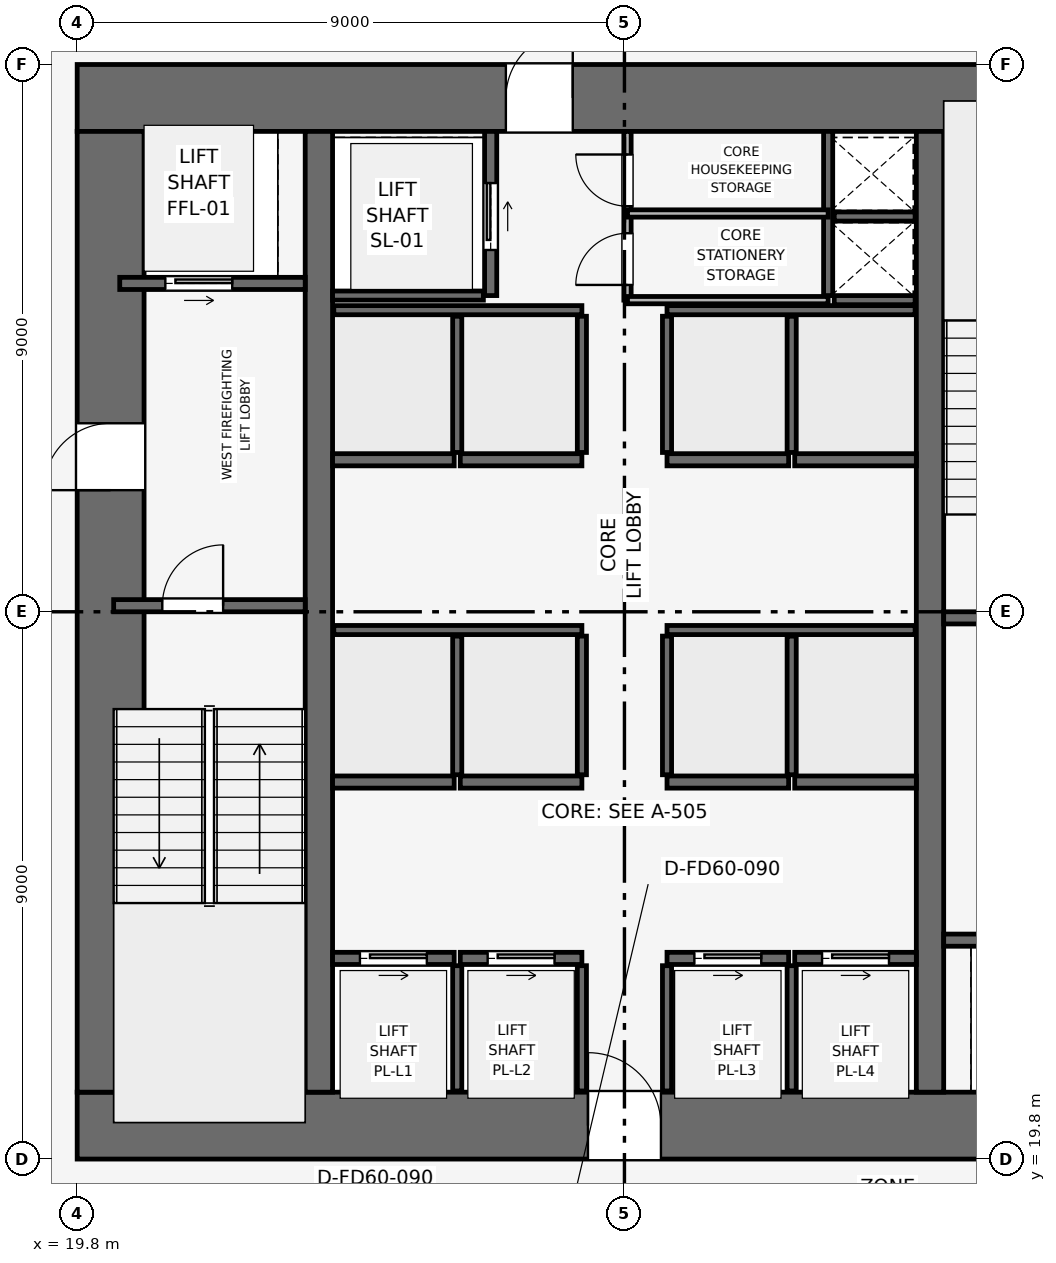
"""IFC4 building model, lengths in metres.
Left out: names, types, materials, properties, quantities, classifications, styles, units other than length and angle.
Written with IfcOpenShell. Run it as: python <this file> out.ifc"""

import sys

from ifc_helpers import new_model, si_unit, direction, frame, frame_2d, origin, place, context, subcontext, project, spatial, rectangle, extrude, element, fill, save


model = new_model("IFC4")
c1 = context("Model", 3, precision=1e-05, world=origin(), true_north=direction((0.0, 1.0)))
c2 = subcontext(c1, "Body", "Model", "MODEL_VIEW")
j1 = project(units=[si_unit("LENGTHUNIT", "METRE"), si_unit("PLANEANGLEUNIT", "RADIAN")], contexts=[c1])
p1 = place(None, origin())
s1 = spatial("IfcSite", under=j1, at=p1, CompositionType="ELEMENT")
p2 = place(p1, origin())
s2 = spatial("IfcBuilding", under=s1, at=p2, CompositionType="ELEMENT")
p3 = place(p2, frame((0.0, 0.0, 80.7)))
s3 = spatial("IfcBuildingStorey", under=s2, at=p3, CompositionType="ELEMENT", Elevation=80.7)
p4 = place(p3, frame((19.8, 20.35, 0.0), z_axis=(0.0, 0.0, 1.0), x_axis=(1.0, 0.0, 0.0)))
e1 = element("IfcWall", 1, at=p4, inside=s3, PredefinedType="SHEAR", context=c2, shape_type="SweptSolid", body=[
    extrude(rectangle(XDim=18.0, YDim=1.1, at=frame_2d((9.0, 0.0))), origin(), (0.0, 0.0, 1.0), 3.9),
])
p5 = place(p4, frame((8.4, 0.0, 0.0)))
e2 = element("IfcOpeningElement", 2, at=p5, cuts=e1, PredefinedType="OPENING", context=c2, shape_type="SweptSolid", body=[
    extrude(rectangle(XDim=1.2, YDim=2.2, at=frame_2d((0.6, 1.1))), frame((0.0, 0.56, 0.0), z_axis=(0.0, -1.0, 0.0), x_axis=(1.0, 0.0, 0.0)), (0.0, 0.0, 1.0), 1.12),
])
p6 = place(p3, frame((19.8, 37.25, 0.0), z_axis=(0.0, 0.0, 1.0), x_axis=(1.0, 0.0, 0.0)))
e3 = element("IfcWall", 3, at=p6, inside=s3, PredefinedType="SHEAR", context=c2, shape_type="SweptSolid", body=[
    extrude(rectangle(XDim=18.0, YDim=1.1, at=frame_2d((9.0, 0.0))), origin(), (0.0, 0.0, 1.0), 3.9),
])
p7 = place(p6, frame((7.05, 0.0, 0.0)))
e4 = element("IfcOpeningElement", 4, at=p7, cuts=e3, PredefinedType="OPENING", context=c2, shape_type="SweptSolid", body=[
    extrude(rectangle(XDim=1.1, YDim=2.15, at=frame_2d((0.55, 1.075))), frame((0.0, 0.56, 0.0), z_axis=(0.0, -1.0, 0.0), x_axis=(1.0, 0.0, 0.0)), (0.0, 0.0, 1.0), 1.12),
])
p8 = place(p3, frame((20.35, 20.9, 0.0), z_axis=(0.0, 0.0, 1.0), x_axis=(0.0, 1.0, 0.0)))
e5 = element("IfcWall", 5, at=p8, inside=s3, PredefinedType="SHEAR", context=c2, shape_type="SweptSolid", body=[
    extrude(rectangle(XDim=15.8, YDim=1.1, at=frame_2d((7.9, 0.0))), origin(), (0.0, 0.0, 1.0), 3.9),
])
p9 = place(p8, frame((9.9, 0.0, 0.0)))
e6 = element("IfcOpeningElement", 6, at=p9, cuts=e5, PredefinedType="OPENING", context=c2, shape_type="SweptSolid", body=[
    extrude(rectangle(XDim=1.1, YDim=2.15, at=frame_2d((0.55, 1.075))), frame((0.0, 0.56, 0.0), z_axis=(0.0, -1.0, 0.0), x_axis=(1.0, 0.0, 0.0)), (0.0, 0.0, 1.0), 1.12),
])
for number, where, z_axis, x_axis in (
    (7, (23.775, 20.9, 0.0), (0.0, 0.0, 1.0), (0.0, 1.0, 0.0)),
    (8, (33.825, 20.9, 0.0), (0.0, 0.0, 1.0), (0.0, 1.0, 0.0)),
):
    element("IfcWall", number, at=place(p3, frame(where, z_axis=z_axis, x_axis=x_axis)), inside=s3, PredefinedType="SHEAR", context=c2, shape_type="SweptSolid", body=[
        extrude(rectangle(XDim=15.8, YDim=0.45, at=frame_2d((7.9, 0.0))), origin(), (0.0, 0.0, 1.0), 3.9),
    ])
p10 = place(p3, frame((20.4, 28.9, 0.0), z_axis=(0.0, 0.0, 1.0), x_axis=(1.0, 0.0, 0.0)))
e9 = element("IfcWall", 9, at=p10, inside=s3, PredefinedType="SHEAR", context=c2, shape_type="SweptSolid", body=[
    extrude(rectangle(XDim=3.15, YDim=0.2, at=frame_2d((1.575, 0.0))), origin(), (0.0, 0.0, 1.0), 3.65),
])
p11 = place(p10, frame((0.8, 0.0, 0.0)))
e10 = element("IfcOpeningElement", 10, at=p11, cuts=e9, PredefinedType="OPENING", context=c2, shape_type="SweptSolid", body=[
    extrude(rectangle(XDim=1.0, YDim=2.1, at=frame_2d((0.5, 1.05))), frame((0.0, 0.11, 0.0), z_axis=(0.0, -1.0, 0.0), x_axis=(1.0, 0.0, 0.0)), (0.0, 0.0, 1.0), 0.22),
])
p12 = place(p3, frame((34.05, 28.7, 0.0), z_axis=(0.0, 0.0, 1.0), x_axis=(1.0, 0.0, 0.0)))
e11 = element("IfcWall", 11, at=p12, inside=s3, PredefinedType="SHEAR", context=c2, shape_type="SweptSolid", body=[
    extrude(rectangle(XDim=3.15, YDim=0.2, at=frame_2d((1.575, 0.0))), origin(), (0.0, 0.0, 1.0), 3.65),
])
p13 = place(p12, frame((0.8, 0.0, 0.0)))
e12 = element("IfcOpeningElement", 12, at=p13, cuts=e11, PredefinedType="OPENING", context=c2, shape_type="SweptSolid", body=[
    extrude(rectangle(XDim=1.0, YDim=2.1, at=frame_2d((0.5, 1.05))), frame((0.0, 0.11, 0.0), z_axis=(0.0, -1.0, 0.0), x_axis=(1.0, 0.0, 0.0)), (0.0, 0.0, 1.0), 0.22),
])
p14 = place(p3, frame((32.15, 34.0, 0.0), z_axis=(0.0, 0.0, 1.0), x_axis=(0.0, 1.0, 0.0)))
e13 = element("IfcWall", 13, at=p14, inside=s3, PredefinedType="SHEAR", context=c2, shape_type="SweptSolid", body=[
    extrude(rectangle(XDim=2.7, YDim=0.15, at=frame_2d((1.35, 0.0))), origin(), (0.0, 0.0, 1.0), 3.65),
])
for number, where, z_axis, x_axis in (
    (14, (32.25, 33.925, 0.0), (0.0, 0.0, 1.0), (1.0, 0.0, 0.0)),
    (15, (32.25, 35.3, 0.0), (0.0, 0.0, 1.0), (1.0, 0.0, 0.0)),
):
    element("IfcWall", number, at=place(p3, frame(where, z_axis=z_axis, x_axis=x_axis)), inside=s3, PredefinedType="SHEAR", context=c2, shape_type="SweptSolid", body=[
        extrude(rectangle(XDim=1.33, YDim=0.15, at=frame_2d((0.665, 0.0))), origin(), (0.0, 0.0, 1.0), 3.65),
    ])
p15 = place(p3, frame((20.5, 34.2, 0.0), z_axis=(0.0, 0.0, 1.0), x_axis=(1.0, 0.0, 0.0)))
e16 = element("IfcWall", 16, at=p15, inside=s3, PredefinedType="SHEAR", context=c2, shape_type="SweptSolid", body=[
    extrude(rectangle(XDim=3.05, YDim=0.2, at=frame_2d((1.525, 0.0))), origin(), (0.0, 0.0, 1.0), 3.65),
])
p16 = place(p15, frame((0.75, 0.0, 0.0)))
e17 = element("IfcOpeningElement", 17, at=p16, cuts=e16, PredefinedType="OPENING", context=c2, shape_type="SweptSolid", body=[
    extrude(rectangle(XDim=1.1, YDim=2.15, at=frame_2d((0.55, 1.075))), frame((0.0, 0.11, 0.0), z_axis=(0.0, -1.0, 0.0), x_axis=(1.0, 0.0, 0.0)), (0.0, 0.0, 1.0), 0.22),
])
p17 = place(p3, frame((34.05, 23.4, 0.0), z_axis=(0.0, 0.0, 1.0), x_axis=(1.0, 0.0, 0.0)))
e18 = element("IfcWall", 18, at=p17, inside=s3, PredefinedType="SHEAR", context=c2, shape_type="SweptSolid", body=[
    extrude(rectangle(XDim=3.05, YDim=0.2, at=frame_2d((1.525, 0.0))), origin(), (0.0, 0.0, 1.0), 3.65),
])
p18 = place(p17, frame((1.2, 0.0, 0.0)))
e19 = element("IfcOpeningElement", 19, at=p18, cuts=e18, PredefinedType="OPENING", context=c2, shape_type="SweptSolid", body=[
    extrude(rectangle(XDim=1.1, YDim=2.15, at=frame_2d((0.55, 1.075))), frame((0.0, 0.11, 0.0), z_axis=(0.0, -1.0, 0.0), x_axis=(1.0, 0.0, 0.0)), (0.0, 0.0, 1.0), 0.22),
])
p19 = place(p3, frame((26.6, 34.0, 0.0), z_axis=(0.0, 0.0, 1.0), x_axis=(0.0, 1.0, 0.0)))
e20 = element("IfcWall", 20, at=p19, inside=s3, PredefinedType="SHEAR", context=c2, shape_type="SweptSolid", body=[
    extrude(rectangle(XDim=2.7, YDim=0.2, at=frame_2d((1.35, 0.0))), origin(), (0.0, 0.0, 1.0), 3.65),
])
p20 = place(p19, frame((0.75, 0.0, 0.0)))
e21 = element("IfcOpeningElement", 21, at=p20, cuts=e20, PredefinedType="OPENING", context=c2, shape_type="SweptSolid", body=[
    extrude(rectangle(XDim=1.1, YDim=2.15, at=frame_2d((0.55, 1.075))), frame((0.0, 0.11, 0.0), z_axis=(0.0, -1.0, 0.0), x_axis=(1.0, 0.0, 0.0)), (0.0, 0.0, 1.0), 0.22),
])
p21 = place(p3, frame((24.0, 34.0, 0.0), z_axis=(0.0, 0.0, 1.0), x_axis=(1.0, 0.0, 0.0)))
e22 = element("IfcWall", 22, at=p21, inside=s3, PredefinedType="SHEAR", context=c2, shape_type="SweptSolid", body=[
    extrude(rectangle(XDim=2.48, YDim=0.15, at=frame_2d((1.24, 0.0))), origin(), (0.0, 0.0, 1.0), 3.65),
])
p22 = place(p3, frame((24.0, 23.1, 0.0), z_axis=(0.0, 0.0, 1.0), x_axis=(1.0, 0.0, 0.0)))
e23 = element("IfcWall", 23, at=p22, inside=s3, PredefinedType="SHEAR", context=c2, shape_type="SweptSolid", body=[
    extrude(rectangle(XDim=2.0, YDim=0.2, at=frame_2d((1.0, 0.0))), origin(), (0.0, 0.0, 1.0), 3.65),
])
p23 = place(p22, frame((0.45, 0.0, 0.0)))
e24 = element("IfcOpeningElement", 24, at=p23, cuts=e23, PredefinedType="OPENING", context=c2, shape_type="SweptSolid", body=[
    extrude(rectangle(XDim=1.1, YDim=2.15, at=frame_2d((0.55, 1.075))), frame((0.0, 0.11, 0.0), z_axis=(0.0, -1.0, 0.0), x_axis=(1.0, 0.0, 0.0)), (0.0, 0.0, 1.0), 0.22),
])
p24 = place(p3, frame((26.1, 23.1, 0.0), z_axis=(0.0, 0.0, 1.0), x_axis=(1.0, 0.0, 0.0)))
e25 = element("IfcWall", 25, at=p24, inside=s3, PredefinedType="SHEAR", context=c2, shape_type="SweptSolid", body=[
    extrude(rectangle(XDim=2.0, YDim=0.2, at=frame_2d((1.0, 0.0))), origin(), (0.0, 0.0, 1.0), 3.65),
])
p25 = place(p24, frame((0.45, 0.0, 0.0)))
e26 = element("IfcOpeningElement", 26, at=p25, cuts=e25, PredefinedType="OPENING", context=c2, shape_type="SweptSolid", body=[
    extrude(rectangle(XDim=1.1, YDim=2.15, at=frame_2d((0.55, 1.075))), frame((0.0, 0.11, 0.0), z_axis=(0.0, -1.0, 0.0), x_axis=(1.0, 0.0, 0.0)), (0.0, 0.0, 1.0), 0.22),
])
p26 = place(p3, frame((29.5, 23.1, 0.0), z_axis=(0.0, 0.0, 1.0), x_axis=(1.0, 0.0, 0.0)))
e27 = element("IfcWall", 27, at=p26, inside=s3, PredefinedType="SHEAR", context=c2, shape_type="SweptSolid", body=[
    extrude(rectangle(XDim=2.0, YDim=0.2, at=frame_2d((1.0, 0.0))), origin(), (0.0, 0.0, 1.0), 3.65),
])
p27 = place(p26, frame((0.45, 0.0, 0.0)))
e28 = element("IfcOpeningElement", 28, at=p27, cuts=e27, PredefinedType="OPENING", context=c2, shape_type="SweptSolid", body=[
    extrude(rectangle(XDim=1.1, YDim=2.15, at=frame_2d((0.55, 1.075))), frame((0.0, 0.11, 0.0), z_axis=(0.0, -1.0, 0.0), x_axis=(1.0, 0.0, 0.0)), (0.0, 0.0, 1.0), 0.22),
])
p28 = place(p3, frame((31.6, 23.1, 0.0), z_axis=(0.0, 0.0, 1.0), x_axis=(1.0, 0.0, 0.0)))
e29 = element("IfcWall", 29, at=p28, inside=s3, PredefinedType="SHEAR", context=c2, shape_type="SweptSolid", body=[
    extrude(rectangle(XDim=2.0, YDim=0.2, at=frame_2d((1.0, 0.0))), origin(), (0.0, 0.0, 1.0), 3.65),
])
p29 = place(p28, frame((0.45, 0.0, 0.0)))
e30 = element("IfcOpeningElement", 30, at=p29, cuts=e29, PredefinedType="OPENING", context=c2, shape_type="SweptSolid", body=[
    extrude(rectangle(XDim=1.1, YDim=2.15, at=frame_2d((0.55, 1.075))), frame((0.0, 0.11, 0.0), z_axis=(0.0, -1.0, 0.0), x_axis=(1.0, 0.0, 0.0)), (0.0, 0.0, 1.0), 0.22),
])
for number, where, z_axis, x_axis in (
    (31, (24.0, 26.0, 0.0), (0.0, 0.0, 1.0), (1.0, 0.0, 0.0)),
    (32, (26.1, 26.0, 0.0), (0.0, 0.0, 1.0), (1.0, 0.0, 0.0)),
    (33, (29.5, 26.0, 0.0), (0.0, 0.0, 1.0), (1.0, 0.0, 0.0)),
    (34, (31.6, 26.0, 0.0), (0.0, 0.0, 1.0), (1.0, 0.0, 0.0)),
    (35, (24.0, 31.3, 0.0), (0.0, 0.0, 1.0), (1.0, 0.0, 0.0)),
    (36, (26.1, 31.3, 0.0), (0.0, 0.0, 1.0), (1.0, 0.0, 0.0)),
    (37, (29.5, 31.3, 0.0), (0.0, 0.0, 1.0), (1.0, 0.0, 0.0)),
    (38, (31.6, 31.3, 0.0), (0.0, 0.0, 1.0), (1.0, 0.0, 0.0)),
):
    element("IfcWall", number, at=place(p3, frame(where, z_axis=z_axis, x_axis=x_axis)), inside=s3, PredefinedType="SHEAR", context=c2, shape_type="SweptSolid", body=[
        extrude(rectangle(XDim=2.0, YDim=0.2, at=frame_2d((1.0, 0.0))), origin(), (0.0, 0.0, 1.0), 3.65),
    ])
for number, where, z_axis, x_axis in (
    (39, (26.05, 20.92, 0.0), (0.0, 0.0, 1.0), (0.0, 1.0, 0.0)),
    (40, (28.1, 20.92, 0.0), (0.0, 0.0, 1.0), (0.0, 1.0, 0.0)),
    (41, (29.5, 20.92, 0.0), (0.0, 0.0, 1.0), (0.0, 1.0, 0.0)),
    (42, (31.55, 20.92, 0.0), (0.0, 0.0, 1.0), (0.0, 1.0, 0.0)),
):
    element("IfcWall", number, at=place(p3, frame(where, z_axis=z_axis, x_axis=x_axis)), inside=s3, PredefinedType="SHEAR", context=c2, shape_type="SweptSolid", body=[
        extrude(rectangle(XDim=2.06, YDim=0.15, at=frame_2d((1.03, 0.0))), origin(), (0.0, 0.0, 1.0), 3.65),
    ])
for number, where, z_axis, x_axis in (
    (43, (24.02, 28.5, 0.0), (0.0, 0.0, 1.0), (1.0, 0.0, 0.0)),
    (44, (29.5, 28.5, 0.0), (0.0, 0.0, 1.0), (1.0, 0.0, 0.0)),
):
    element("IfcWall", number, at=place(p3, frame(where, z_axis=z_axis, x_axis=x_axis)), inside=s3, PredefinedType="SHEAR", context=c2, shape_type="SweptSolid", body=[
        extrude(rectangle(XDim=4.08, YDim=0.15, at=frame_2d((2.04, 0.0))), origin(), (0.0, 0.0, 1.0), 3.65),
    ])
for number, where, z_axis, x_axis in (
    (45, (26.05, 26.12, 0.0), (0.0, 0.0, 1.0), (0.0, 1.0, 0.0)),
    (46, (28.1, 26.12, 0.0), (0.0, 0.0, 1.0), (0.0, 1.0, 0.0)),
    (47, (29.5, 26.12, 0.0), (0.0, 0.0, 1.0), (0.0, 1.0, 0.0)),
    (48, (31.55, 26.12, 0.0), (0.0, 0.0, 1.0), (0.0, 1.0, 0.0)),
):
    element("IfcWall", number, at=place(p3, frame(where, z_axis=z_axis, x_axis=x_axis)), inside=s3, PredefinedType="SHEAR", context=c2, shape_type="SweptSolid", body=[
        extrude(rectangle(XDim=2.28, YDim=0.15, at=frame_2d((1.14, 0.0))), origin(), (0.0, 0.0, 1.0), 3.65),
    ])
for number, where, z_axis, x_axis in (
    (49, (24.02, 33.76, 0.0), (0.0, 0.0, 1.0), (1.0, 0.0, 0.0)),
    (50, (29.5, 33.76, 0.0), (0.0, 0.0, 1.0), (1.0, 0.0, 0.0)),
):
    element("IfcWall", number, at=place(p3, frame(where, z_axis=z_axis, x_axis=x_axis)), inside=s3, PredefinedType="SHEAR", context=c2, shape_type="SweptSolid", body=[
        extrude(rectangle(XDim=4.08, YDim=0.15, at=frame_2d((2.04, 0.0))), origin(), (0.0, 0.0, 1.0), 3.65),
    ])
for number, where, z_axis, x_axis in (
    (51, (26.05, 31.42, 0.0), (0.0, 0.0, 1.0), (0.0, 1.0, 0.0)),
    (52, (28.1, 31.42, 0.0), (0.0, 0.0, 1.0), (0.0, 1.0, 0.0)),
    (53, (29.5, 31.42, 0.0), (0.0, 0.0, 1.0), (0.0, 1.0, 0.0)),
    (54, (31.55, 31.42, 0.0), (0.0, 0.0, 1.0), (0.0, 1.0, 0.0)),
):
    element("IfcWall", number, at=place(p3, frame(where, z_axis=z_axis, x_axis=x_axis)), inside=s3, PredefinedType="SHEAR", context=c2, shape_type="SweptSolid", body=[
        extrude(rectangle(XDim=2.24, YDim=0.15, at=frame_2d((1.12, 0.0))), origin(), (0.0, 0.0, 1.0), 3.65),
    ])
p30 = place(p3, frame((28.85, 33.925, 0.0), z_axis=(0.0, 0.0, 1.0), x_axis=(0.0, 1.0, 0.0)))
e55 = element("IfcWall", 55, at=p30, inside=s3, PredefinedType="PARTITIONING", context=c2, shape_type="SweptSolid", body=[
    extrude(rectangle(XDim=2.775, YDim=0.12, at=frame_2d((1.387, 0.0))), origin(), (0.0, 0.0, 1.0), 3.65),
])
p31 = place(p30, frame((0.25, 0.0, 0.0)))
e56 = element("IfcOpeningElement", 56, at=p31, cuts=e55, PredefinedType="OPENING", context=c2, shape_type="SweptSolid", body=[
    extrude(rectangle(XDim=0.85, YDim=2.1, at=frame_2d((0.425, 1.05))), frame((0.0, 0.07, 0.0), z_axis=(0.0, -1.0, 0.0), x_axis=(1.0, 0.0, 0.0)), (0.0, 0.0, 1.0), 0.14),
])
p32 = place(p30, frame((1.545, 0.0, 0.0)))
e57 = element("IfcOpeningElement", 57, at=p32, cuts=e55, PredefinedType="OPENING", context=c2, shape_type="SweptSolid", body=[
    extrude(rectangle(XDim=0.85, YDim=2.1, at=frame_2d((0.425, 1.05))), frame((0.0, 0.07, 0.0), z_axis=(0.0, -1.0, 0.0), x_axis=(1.0, 0.0, 0.0)), (0.0, 0.0, 1.0), 0.14),
])
for number, where, z_axis, x_axis in (
    (58, (28.85, 35.35, 0.0), (0.0, 0.0, 1.0), (1.0, 0.0, 0.0)),
    (59, (28.85, 33.925, 0.0), (0.0, 0.0, 1.0), (1.0, 0.0, 0.0)),
):
    element("IfcWall", number, at=place(p3, frame(where, z_axis=z_axis, x_axis=x_axis)), inside=s3, PredefinedType="PARTITIONING", context=c2, shape_type="SweptSolid", body=[
        extrude(rectangle(XDim=3.3, YDim=0.12, at=frame_2d((1.65, 0.0))), origin(), (0.0, 0.0, 1.0), 3.65),
    ])
p33 = place(p11, origin())
e60 = element("IfcDoor", 60, at=p33, inside=s3, OperationType="SINGLE_SWING_RIGHT", PredefinedType="DOOR", context=c2, shape_type="SweptSolid", body=[
    extrude(rectangle(XDim=1.0, YDim=2.1, at=frame_2d((0.5, 1.05))), frame((0.0, 0.025, 0.0), z_axis=(0.0, -1.0, 0.0), x_axis=(1.0, 0.0, 0.0)), (0.0, 0.0, 1.0), 0.05),
])
fill(e10, e60)
p34 = place(p16, origin())
e61 = element("IfcDoor", 61, at=p34, inside=s3, OperationType="SLIDING_TO_RIGHT", PredefinedType="DOOR", context=c2, shape_type="SweptSolid", body=[
    extrude(rectangle(XDim=1.1, YDim=2.15, at=frame_2d((0.55, 1.075))), frame((0.0, 0.025, 0.0), z_axis=(0.0, -1.0, 0.0), x_axis=(1.0, 0.0, 0.0)), (0.0, 0.0, 1.0), 0.05),
])
fill(e17, e61)
p35 = place(p20, origin())
e62 = element("IfcDoor", 62, at=p35, inside=s3, OperationType="SLIDING_TO_RIGHT", PredefinedType="DOOR", context=c2, shape_type="SweptSolid", body=[
    extrude(rectangle(XDim=1.1, YDim=2.15, at=frame_2d((0.55, 1.075))), frame((0.0, 0.025, 0.0), z_axis=(0.0, -1.0, 0.0), x_axis=(1.0, 0.0, 0.0)), (0.0, 0.0, 1.0), 0.05),
])
fill(e21, e62)
p36 = place(p23, origin())
e63 = element("IfcDoor", 63, at=p36, inside=s3, OperationType="SLIDING_TO_RIGHT", PredefinedType="DOOR", context=c2, shape_type="SweptSolid", body=[
    extrude(rectangle(XDim=1.1, YDim=2.15, at=frame_2d((0.55, 1.075))), frame((0.0, 0.025, 0.0), z_axis=(0.0, -1.0, 0.0), x_axis=(1.0, 0.0, 0.0)), (0.0, 0.0, 1.0), 0.05),
])
fill(e24, e63)
p37 = place(p25, origin())
e64 = element("IfcDoor", 64, at=p37, inside=s3, OperationType="SLIDING_TO_RIGHT", PredefinedType="DOOR", context=c2, shape_type="SweptSolid", body=[
    extrude(rectangle(XDim=1.1, YDim=2.15, at=frame_2d((0.55, 1.075))), frame((0.0, 0.025, 0.0), z_axis=(0.0, -1.0, 0.0), x_axis=(1.0, 0.0, 0.0)), (0.0, 0.0, 1.0), 0.05),
])
fill(e26, e64)
p38 = place(p27, origin())
e65 = element("IfcDoor", 65, at=p38, inside=s3, OperationType="SLIDING_TO_RIGHT", PredefinedType="DOOR", context=c2, shape_type="SweptSolid", body=[
    extrude(rectangle(XDim=1.1, YDim=2.15, at=frame_2d((0.55, 1.075))), frame((0.0, 0.025, 0.0), z_axis=(0.0, -1.0, 0.0), x_axis=(1.0, 0.0, 0.0)), (0.0, 0.0, 1.0), 0.05),
])
fill(e28, e65)
p39 = place(p29, origin())
e66 = element("IfcDoor", 66, at=p39, inside=s3, OperationType="SLIDING_TO_RIGHT", PredefinedType="DOOR", context=c2, shape_type="SweptSolid", body=[
    extrude(rectangle(XDim=1.1, YDim=2.15, at=frame_2d((0.55, 1.075))), frame((0.0, 0.025, 0.0), z_axis=(0.0, -1.0, 0.0), x_axis=(1.0, 0.0, 0.0)), (0.0, 0.0, 1.0), 0.05),
])
fill(e30, e66)
p40 = place(p31, origin())
e67 = element("IfcDoor", 67, at=p40, inside=s3, OperationType="SINGLE_SWING_LEFT", PredefinedType="DOOR", context=c2, shape_type="SweptSolid", body=[
    extrude(rectangle(XDim=0.85, YDim=2.1, at=frame_2d((0.425, 1.05))), frame((0.0, 0.025, 0.0), z_axis=(0.0, -1.0, 0.0), x_axis=(1.0, 0.0, 0.0)), (0.0, 0.0, 1.0), 0.05),
])
fill(e56, e67)
p41 = place(p32, origin())
e68 = element("IfcDoor", 68, at=p41, inside=s3, OperationType="SINGLE_SWING_RIGHT", PredefinedType="DOOR", context=c2, shape_type="SweptSolid", body=[
    extrude(rectangle(XDim=0.85, YDim=2.1, at=frame_2d((0.425, 1.05))), frame((0.0, 0.025, 0.0), z_axis=(0.0, -1.0, 0.0), x_axis=(1.0, 0.0, 0.0)), (0.0, 0.0, 1.0), 0.05),
])
fill(e57, e68)
p42 = place(p9, origin())
e69 = element("IfcDoor", 69, at=p42, inside=s3, OperationType="SINGLE_SWING_LEFT", PredefinedType="DOOR", context=c2, shape_type="SweptSolid", body=[
    extrude(rectangle(XDim=1.1, YDim=2.15, at=frame_2d((0.55, 1.075))), frame((0.0, 0.025, 0.0), z_axis=(0.0, -1.0, 0.0), x_axis=(1.0, 0.0, 0.0)), (0.0, 0.0, 1.0), 0.05),
])
fill(e6, e69)
p43 = place(p5, origin())
e70 = element("IfcDoor", 70, at=p43, inside=s3, OperationType="SINGLE_SWING_LEFT", PredefinedType="DOOR", context=c2, shape_type="SweptSolid", body=[
    extrude(rectangle(XDim=1.2, YDim=2.2, at=frame_2d((0.6, 1.1))), frame((0.0, 0.025, 0.0), z_axis=(0.0, -1.0, 0.0), x_axis=(1.0, 0.0, 0.0)), (0.0, 0.0, 1.0), 0.05),
])
fill(e2, e70)
p44 = place(p7, origin())
e71 = element("IfcDoor", 71, at=p44, inside=s3, OperationType="SINGLE_SWING_RIGHT", PredefinedType="DOOR", context=c2, shape_type="SweptSolid", body=[
    extrude(rectangle(XDim=1.1, YDim=2.15, at=frame_2d((0.55, 1.075))), frame((0.0, 0.025, 0.0), z_axis=(0.0, -1.0, 0.0), x_axis=(1.0, 0.0, 0.0)), (0.0, 0.0, 1.0), 0.05),
])
fill(e4, e71)
save(model, sys.argv[1])
